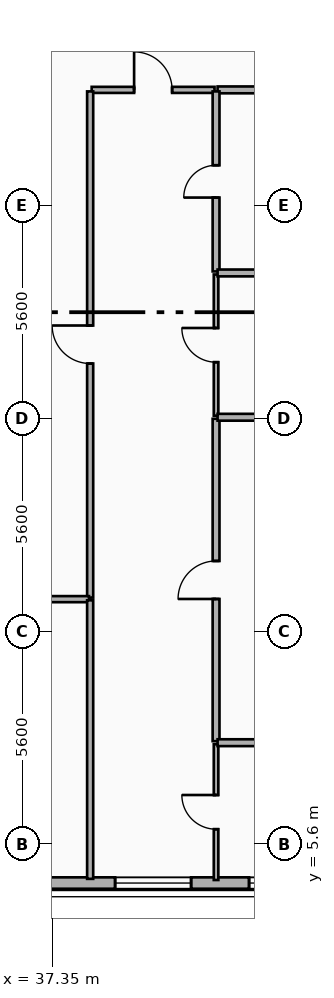
"""IFC4 building model, lengths in metres.
Left out: names, types, materials, properties, quantities, classifications, styles, units other than length and angle.
Written with IfcOpenShell. Run it as: python <this file> out.ifc"""

import sys

from ifc_helpers import new_model, si_unit, direction, frame, frame_2d, origin, place, context, subcontext, project, spatial, rectangle, extrude, element, fill, save


model = new_model("IFC4")
c1 = context("Model", 3, precision=1e-05, world=origin(), true_north=direction((0.0, 1.0)))
c2 = subcontext(c1, "Body", "Model", "MODEL_VIEW")
j1 = project(units=[si_unit("LENGTHUNIT", "METRE"), si_unit("PLANEANGLEUNIT", "RADIAN")], contexts=[c1])
p1 = place(None, origin())
s1 = spatial("IfcSite", under=j1, at=p1, CompositionType="ELEMENT")
p2 = place(p1, origin())
s2 = spatial("IfcBuilding", under=s1, at=p2, CompositionType="ELEMENT")
p3 = place(p2, frame((0.0, 0.0, 200.4)))
s3 = spatial("IfcBuildingStorey", under=s2, at=p3, CompositionType="ELEMENT", Elevation=200.4)
p4 = place(p3, frame((48.0, 4.58, 0.0), z_axis=(0.0, 0.0, 1.0), x_axis=(-1.0, 0.0, 0.0)))
e1 = element("IfcWall", 1, at=p4, inside=s3, PredefinedType="SOLIDWALL", context=c2, shape_type="SweptSolid", body=[
    extrude(rectangle(XDim=38.4, YDim=0.3, at=frame_2d((19.2, 0.0))), origin(), (0.0, 0.0, 1.0), 3.34),
])
p5 = place(p4, frame((36.19, 0.0, 0.8)))
e2 = element("IfcOpeningElement", 2, at=p5, cuts=e1, PredefinedType="OPENING", context=c2, shape_type="SweptSolid", body=[
    extrude(rectangle(XDim=1.8, YDim=1.8, at=frame_2d((0.9, 0.9))), frame((0.0, 0.16, 0.0), z_axis=(0.0, -1.0, 0.0), x_axis=(1.0, 0.0, 0.0)), (0.0, 0.0, 1.0), 0.32),
])
p6 = place(p4, frame((29.712, 0.0, 0.7)))
e3 = element("IfcOpeningElement", 3, at=p6, cuts=e1, PredefinedType="OPENING", context=c2, shape_type="SweptSolid", body=[
    extrude(rectangle(XDim=2.0, YDim=2.2, at=frame_2d((1.0, 1.1))), frame((0.0, 0.16, 0.0), z_axis=(0.0, -1.0, 0.0), x_axis=(1.0, 0.0, 0.0)), (0.0, 0.0, 1.0), 0.32),
])
p7 = place(p4, frame((33.038, 0.0, 0.7)))
e4 = element("IfcOpeningElement", 4, at=p7, cuts=e1, PredefinedType="OPENING", context=c2, shape_type="SweptSolid", body=[
    extrude(rectangle(XDim=2.0, YDim=2.2, at=frame_2d((1.0, 1.1))), frame((0.0, 0.16, 0.0), z_axis=(0.0, -1.0, 0.0), x_axis=(1.0, 0.0, 0.0)), (0.0, 0.0, 1.0), 0.32),
])
p8 = place(p4, frame((20.0, 0.0, 0.7)))
e5 = element("IfcOpeningElement", 5, at=p8, cuts=e1, PredefinedType="OPENING", context=c2, shape_type="SweptSolid", body=[
    extrude(rectangle(XDim=2.0, YDim=2.2, at=frame_2d((1.0, 1.1))), frame((0.0, 0.16, 0.0), z_axis=(0.0, -1.0, 0.0), x_axis=(1.0, 0.0, 0.0)), (0.0, 0.0, 1.0), 0.32),
])
p9 = place(p4, frame((25.2, 0.0, 0.7)))
e6 = element("IfcOpeningElement", 6, at=p9, cuts=e1, PredefinedType="OPENING", context=c2, shape_type="SweptSolid", body=[
    extrude(rectangle(XDim=2.0, YDim=2.2, at=frame_2d((1.0, 1.1))), frame((0.0, 0.16, 0.0), z_axis=(0.0, -1.0, 0.0), x_axis=(1.0, 0.0, 0.0)), (0.0, 0.0, 1.0), 0.32),
])
p10 = place(p4, frame((13.4, 0.0, 0.7)))
e7 = element("IfcOpeningElement", 7, at=p10, cuts=e1, PredefinedType="OPENING", context=c2, shape_type="SweptSolid", body=[
    extrude(rectangle(XDim=2.0, YDim=2.2, at=frame_2d((1.0, 1.1))), frame((0.0, 0.16, 0.0), z_axis=(0.0, -1.0, 0.0), x_axis=(1.0, 0.0, 0.0)), (0.0, 0.0, 1.0), 0.32),
])
p11 = place(p4, frame((6.993, 0.0, 0.7)))
e8 = element("IfcOpeningElement", 8, at=p11, cuts=e1, PredefinedType="OPENING", context=c2, shape_type="SweptSolid", body=[
    extrude(rectangle(XDim=2.0, YDim=2.2, at=frame_2d((1.0, 1.1))), frame((0.0, 0.16, 0.0), z_axis=(0.0, -1.0, 0.0), x_axis=(1.0, 0.0, 0.0)), (0.0, 0.0, 1.0), 0.32),
])
p12 = place(p4, frame((3.469, 0.0, 0.7)))
e9 = element("IfcOpeningElement", 9, at=p12, cuts=e1, PredefinedType="OPENING", context=c2, shape_type="SweptSolid", body=[
    extrude(rectangle(XDim=2.0, YDim=2.2, at=frame_2d((1.0, 1.1))), frame((0.0, 0.16, 0.0), z_axis=(0.0, -1.0, 0.0), x_axis=(1.0, 0.0, 0.0)), (0.0, 0.0, 1.0), 0.32),
])
p13 = place(p4, frame((0.41, 0.0, 0.8)))
e10 = element("IfcOpeningElement", 10, at=p13, cuts=e1, PredefinedType="OPENING", context=c2, shape_type="SweptSolid", body=[
    extrude(rectangle(XDim=1.8, YDim=1.8, at=frame_2d((0.9, 0.9))), frame((0.0, 0.16, 0.0), z_axis=(0.0, -1.0, 0.0), x_axis=(1.0, 0.0, 0.0)), (0.0, 0.0, 1.0), 0.32),
])
p14 = place(p3, frame((38.39, 25.45, 0.0), z_axis=(0.0, 0.0, 1.0), x_axis=(1.0, 0.0, 0.0)))
e11 = element("IfcWall", 11, at=p14, inside=s3, PredefinedType="PARTITIONING", context=c2, shape_type="SweptSolid", body=[
    extrude(rectangle(XDim=3.233, YDim=0.16, at=frame_2d((1.617, 0.0))), origin(), (0.0, 0.0, 1.0), 3.34),
])
p15 = place(p14, frame((1.116, 0.0, 0.0)))
e12 = element("IfcOpeningElement", 12, at=p15, cuts=e11, PredefinedType="OPENING", context=c2, shape_type="SweptSolid", body=[
    extrude(rectangle(XDim=1.0, YDim=2.15, at=frame_2d((0.5, 1.075))), frame((0.0, 0.09, 0.0), z_axis=(0.0, -1.0, 0.0), x_axis=(1.0, 0.0, 0.0)), (0.0, 0.0, 1.0), 0.18),
])
p16 = place(p3, frame((41.703, 25.45, 0.0), z_axis=(0.0, 0.0, 1.0), x_axis=(1.0, 0.0, 0.0)))
e13 = element("IfcWall", 13, at=p16, inside=s3, PredefinedType="PLUMBINGWALL", context=c2, shape_type="SweptSolid", body=[
    extrude(rectangle(XDim=3.657, YDim=0.18, at=frame_2d((1.829, 0.0))), origin(), (0.0, 0.0, 1.0), 2.42),
])
p17 = place(p3, frame((38.35, 12.09, 0.0), z_axis=(0.0, 0.0, 1.0), x_axis=(0.0, 1.0, 0.0)))
e14 = element("IfcWall", 14, at=p17, inside=s3, PredefinedType="PARTITIONING", context=c2, shape_type="SweptSolid", body=[
    extrude(rectangle(XDim=13.32, YDim=0.16, at=frame_2d((6.66, 0.0))), origin(), (0.0, 0.0, 1.0), 2.87),
])
p18 = place(p17, frame((6.16, 0.0, 0.0)))
e15 = element("IfcOpeningElement", 15, at=p18, cuts=e14, PredefinedType="OPENING", context=c2, shape_type="SweptSolid", body=[
    extrude(rectangle(XDim=1.0, YDim=2.15, at=frame_2d((0.5, 1.075))), frame((0.0, 0.09, 0.0), z_axis=(0.0, -1.0, 0.0), x_axis=(1.0, 0.0, 0.0)), (0.0, 0.0, 1.0), 0.18),
])
p19 = place(p3, frame((41.663, 4.66, 0.0), z_axis=(0.0, 0.0, 1.0), x_axis=(0.0, 1.0, 0.0)))
e16 = element("IfcWall", 16, at=p19, inside=s3, PredefinedType="PARTITIONING", context=c2, shape_type="SweptSolid", body=[
    extrude(rectangle(XDim=3.573, YDim=0.12, at=frame_2d((1.787, 0.0))), origin(), (0.0, 0.0, 1.0), 3.0),
])
p20 = place(p19, frame((1.336, 0.0, 0.0)))
e17 = element("IfcOpeningElement", 17, at=p20, cuts=e16, PredefinedType="OPENING", context=c2, shape_type="SweptSolid", body=[
    extrude(rectangle(XDim=0.9, YDim=2.1, at=frame_2d((0.45, 1.05))), frame((0.0, 0.07, 0.0), z_axis=(0.0, -1.0, 0.0), x_axis=(1.0, 0.0, 0.0)), (0.0, 0.0, 1.0), 0.14),
])
p21 = place(p3, frame((41.663, 8.313, 0.0), z_axis=(0.0, 0.0, 1.0), x_axis=(0.0, 1.0, 0.0)))
e18 = element("IfcWall", 18, at=p21, inside=s3, PredefinedType="PLUMBINGWALL", context=c2, shape_type="SweptSolid", body=[
    extrude(rectangle(XDim=8.483, YDim=0.18, at=frame_2d((4.241, 0.0))), origin(), (0.0, 0.0, 1.0), 2.87),
])
p22 = place(p21, frame((3.741, 0.0, 0.0)))
e19 = element("IfcOpeningElement", 19, at=p22, cuts=e18, PredefinedType="OPENING", context=c2, shape_type="SweptSolid", body=[
    extrude(rectangle(XDim=1.0, YDim=2.15, at=frame_2d((0.5, 1.075))), frame((0.0, 0.1, 0.0), z_axis=(0.0, -1.0, 0.0), x_axis=(1.0, 0.0, 0.0)), (0.0, 0.0, 1.0), 0.2),
])
p23 = place(p3, frame((41.663, 16.876, 0.0), z_axis=(0.0, 0.0, 1.0), x_axis=(0.0, 1.0, 0.0)))
e20 = element("IfcWall", 20, at=p23, inside=s3, PredefinedType="PARTITIONING", context=c2, shape_type="SweptSolid", body=[
    extrude(rectangle(XDim=3.717, YDim=0.12, at=frame_2d((1.858, 0.0))), origin(), (0.0, 0.0, 1.0), 2.87),
])
p24 = place(p23, frame((1.408, 0.0, 0.0)))
e21 = element("IfcOpeningElement", 21, at=p24, cuts=e20, PredefinedType="OPENING", context=c2, shape_type="SweptSolid", body=[
    extrude(rectangle(XDim=0.9, YDim=2.1, at=frame_2d((0.45, 1.05))), frame((0.0, 0.07, 0.0), z_axis=(0.0, -1.0, 0.0), x_axis=(1.0, 0.0, 0.0)), (0.0, 0.0, 1.0), 0.14),
])
p25 = place(p3, frame((41.663, 20.673, 0.0), z_axis=(0.0, 0.0, 1.0), x_axis=(0.0, 1.0, 0.0)))
e22 = element("IfcWall", 22, at=p25, inside=s3, PredefinedType="PLUMBINGWALL", context=c2, shape_type="SweptSolid", body=[
    extrude(rectangle(XDim=4.737, YDim=0.18, at=frame_2d((2.368, 0.0))), origin(), (0.0, 0.0, 1.0), 2.88),
])
p26 = place(p25, frame((1.944, 0.0, 0.0)))
e23 = element("IfcOpeningElement", 23, at=p26, cuts=e22, PredefinedType="OPENING", context=c2, shape_type="SweptSolid", body=[
    extrude(rectangle(XDim=0.85, YDim=2.1, at=frame_2d((0.425, 1.05))), frame((0.0, 0.1, 0.0), z_axis=(0.0, -1.0, 0.0), x_axis=(1.0, 0.0, 0.0)), (0.0, 0.0, 1.0), 0.2),
])
for number, where, z_axis, x_axis in (
    (24, (41.703, 8.273, 0.0), (0.0, 0.0, 1.0), (1.0, 0.0, 0.0)),
    (25, (41.703, 16.836, 0.0), (0.0, 0.0, 1.0), (1.0, 0.0, 0.0)),
    (26, (41.703, 20.633, 0.0), (0.0, 0.0, 1.0), (1.0, 0.0, 0.0)),
):
    element("IfcWall", number, at=place(p3, frame(where, z_axis=z_axis, x_axis=x_axis)), inside=s3, PredefinedType="PLUMBINGWALL", context=c2, shape_type="SweptSolid", body=[
        extrude(rectangle(XDim=3.657, YDim=0.18, at=frame_2d((1.829, 0.0))), origin(), (0.0, 0.0, 1.0), 2.42),
    ])
p27 = place(p3, frame((36.38, 12.05, 0.0), z_axis=(0.0, 0.0, 1.0), x_axis=(1.0, 0.0, 0.0)))
e27 = element("IfcWall", 27, at=p27, inside=s3, PredefinedType="PARTITIONING", context=c2, shape_type="SweptSolid", body=[
    extrude(rectangle(XDim=1.94, YDim=0.16, at=frame_2d((0.97, 0.0))), origin(), (0.0, 0.0, 1.0), 2.42),
])
p28 = place(p3, frame((38.35, 4.69, 0.0), z_axis=(0.0, 0.0, 1.0), x_axis=(0.0, 1.0, 0.0)))
e28 = element("IfcWall", 28, at=p28, inside=s3, PredefinedType="PARTITIONING", context=c2, shape_type="SweptSolid", body=[
    extrude(rectangle(XDim=7.33, YDim=0.16, at=frame_2d((3.665, 0.0))), origin(), (0.0, 0.0, 1.0), 2.87),
])
p29 = place(p11, origin())
e29 = element("IfcWindow", 29, at=p29, inside=s3, PartitioningType="SINGLE_PANEL", PredefinedType="WINDOW", context=c2, shape_type="SweptSolid", body=[
    extrude(rectangle(XDim=2.0, YDim=2.2, at=frame_2d((1.0, 1.1))), frame((0.0, 0.03, 0.0), z_axis=(0.0, -1.0, 0.0), x_axis=(1.0, 0.0, 0.0)), (0.0, 0.0, 1.0), 0.06),
])
fill(e8, e29)
p30 = place(p12, origin())
e30 = element("IfcWindow", 30, at=p30, inside=s3, PartitioningType="SINGLE_PANEL", PredefinedType="WINDOW", context=c2, shape_type="SweptSolid", body=[
    extrude(rectangle(XDim=2.0, YDim=2.2, at=frame_2d((1.0, 1.1))), frame((0.0, 0.03, 0.0), z_axis=(0.0, -1.0, 0.0), x_axis=(1.0, 0.0, 0.0)), (0.0, 0.0, 1.0), 0.06),
])
fill(e9, e30)
p31 = place(p15, origin())
e31 = element("IfcDoor", 31, at=p31, inside=s3, OperationType="SINGLE_SWING_LEFT", PredefinedType="DOOR", context=c2, shape_type="SweptSolid", body=[
    extrude(rectangle(XDim=1.0, YDim=2.15, at=frame_2d((0.5, 1.075))), frame((0.0, 0.025, 0.0), z_axis=(0.0, -1.0, 0.0), x_axis=(1.0, 0.0, 0.0)), (0.0, 0.0, 1.0), 0.05),
])
fill(e12, e31)
p32 = place(p18, origin())
e32 = element("IfcDoor", 32, at=p32, inside=s3, OperationType="SINGLE_SWING_RIGHT", PredefinedType="DOOR", context=c2, shape_type="SweptSolid", body=[
    extrude(rectangle(XDim=1.0, YDim=2.15, at=frame_2d((0.5, 1.075))), frame((0.0, 0.025, 0.0), z_axis=(0.0, -1.0, 0.0), x_axis=(1.0, 0.0, 0.0)), (0.0, 0.0, 1.0), 0.05),
])
fill(e15, e32)
p33 = place(p20, origin())
e33 = element("IfcDoor", 33, at=p33, inside=s3, OperationType="SINGLE_SWING_RIGHT", PredefinedType="DOOR", context=c2, shape_type="SweptSolid", body=[
    extrude(rectangle(XDim=0.9, YDim=2.1, at=frame_2d((0.45, 1.05))), frame((0.0, 0.025, 0.0), z_axis=(0.0, -1.0, 0.0), x_axis=(1.0, 0.0, 0.0)), (0.0, 0.0, 1.0), 0.05),
])
fill(e17, e33)
p34 = place(p22, origin())
e34 = element("IfcDoor", 34, at=p34, inside=s3, OperationType="SINGLE_SWING_LEFT", PredefinedType="DOOR", context=c2, shape_type="SweptSolid", body=[
    extrude(rectangle(XDim=1.0, YDim=2.15, at=frame_2d((0.5, 1.075))), frame((0.0, 0.025, 0.0), z_axis=(0.0, -1.0, 0.0), x_axis=(1.0, 0.0, 0.0)), (0.0, 0.0, 1.0), 0.05),
])
fill(e19, e34)
p35 = place(p24, origin())
e35 = element("IfcDoor", 35, at=p35, inside=s3, OperationType="SINGLE_SWING_RIGHT", PredefinedType="DOOR", context=c2, shape_type="SweptSolid", body=[
    extrude(rectangle(XDim=0.9, YDim=2.1, at=frame_2d((0.45, 1.05))), frame((0.0, 0.025, 0.0), z_axis=(0.0, -1.0, 0.0), x_axis=(1.0, 0.0, 0.0)), (0.0, 0.0, 1.0), 0.05),
])
fill(e21, e35)
p36 = place(p26, origin())
e36 = element("IfcDoor", 36, at=p36, inside=s3, OperationType="SINGLE_SWING_LEFT", PredefinedType="DOOR", context=c2, shape_type="SweptSolid", body=[
    extrude(rectangle(XDim=0.85, YDim=2.1, at=frame_2d((0.425, 1.05))), frame((0.0, 0.025, 0.0), z_axis=(0.0, -1.0, 0.0), x_axis=(1.0, 0.0, 0.0)), (0.0, 0.0, 1.0), 0.05),
])
fill(e23, e36)
save(model, sys.argv[1])
